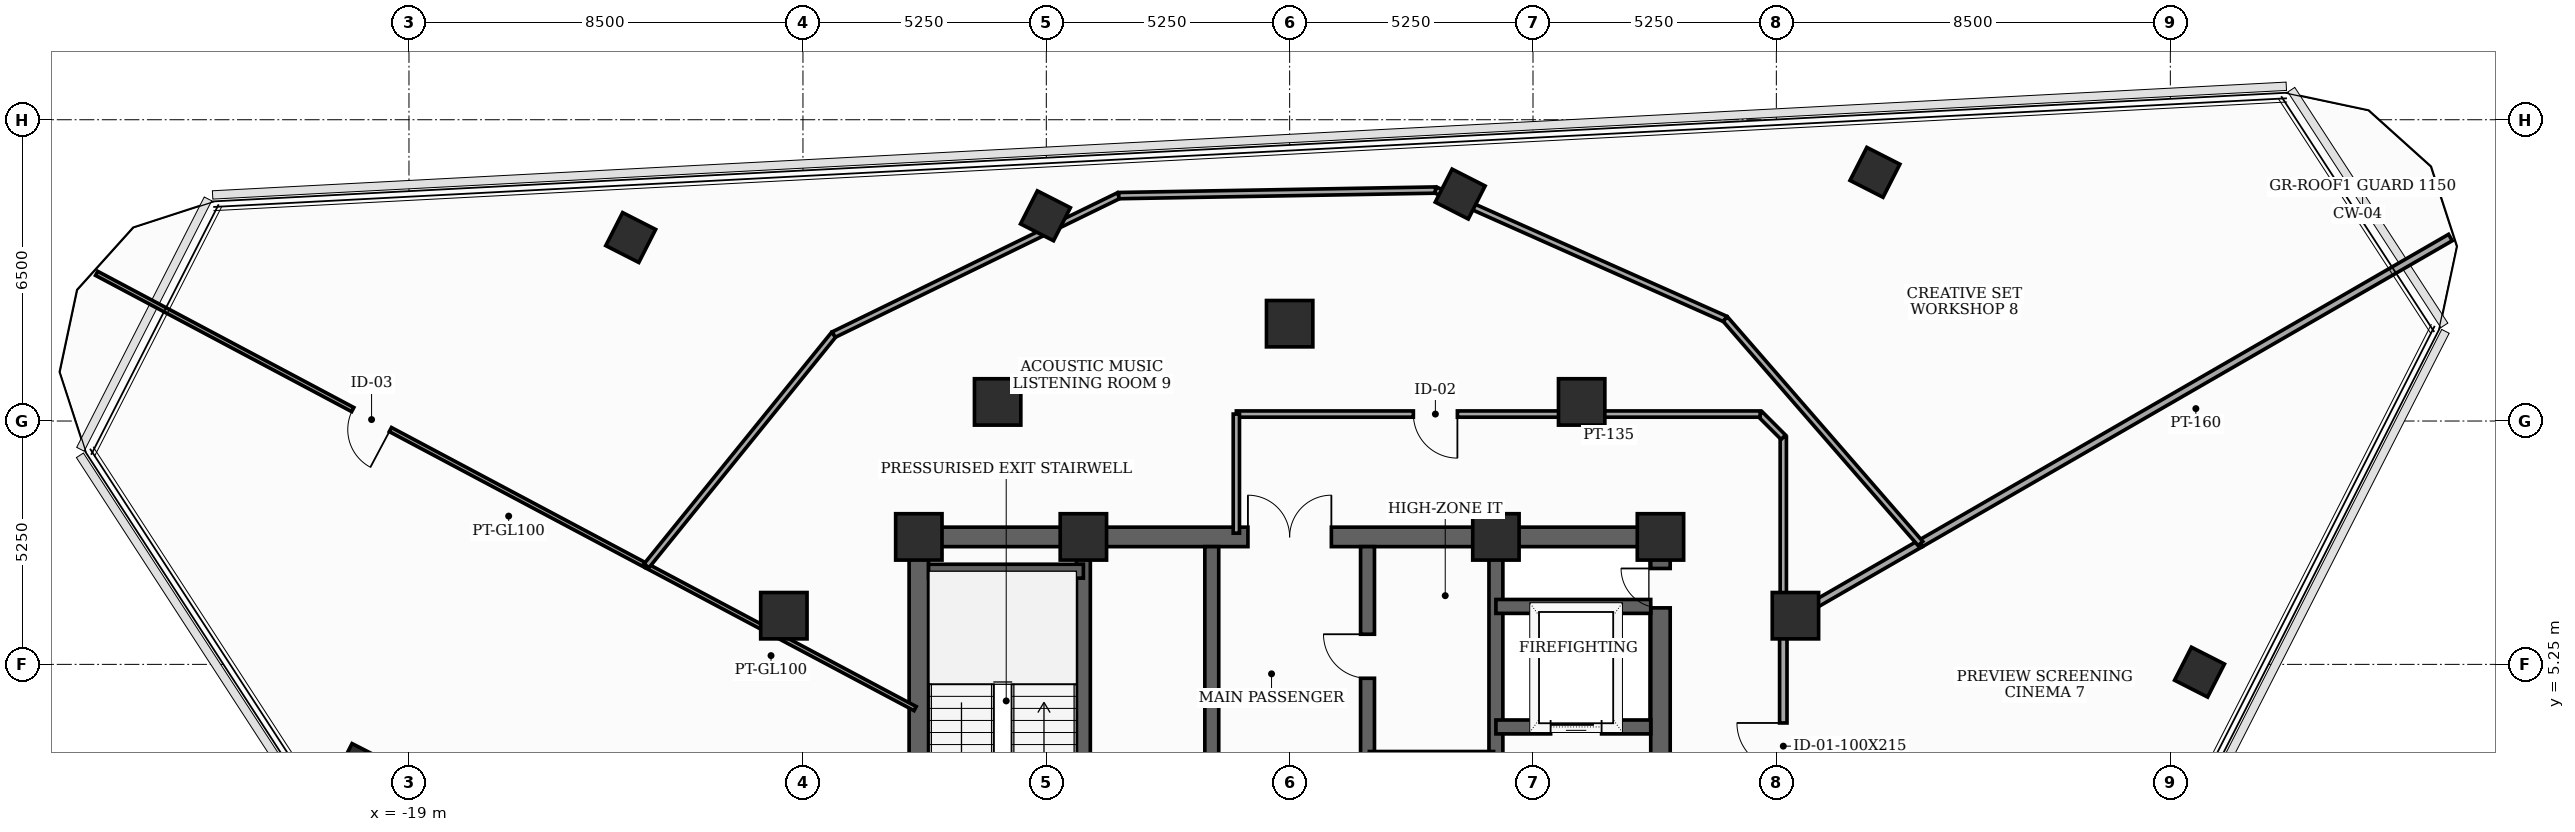
"""IFC4 building model, lengths in metres.
Left out: names, types, materials, properties, quantities, classifications, styles, units other than length and angle.
Written with IfcOpenShell. Run it as: python <this file> out.ifc"""

import sys

from ifc_helpers import new_model, si_unit, direction, frame, frame_2d, origin, origin_2d, place, context, subcontext, project, spatial, rectangle, extrude, element, fill, save


model = new_model("IFC4")
c1 = context("Model", 3, precision=1e-05, world=origin(), true_north=direction((0.0, 1.0)))
c2 = subcontext(c1, "Body", "Model", "MODEL_VIEW")
j1 = project(units=[si_unit("LENGTHUNIT", "METRE"), si_unit("PLANEANGLEUNIT", "RADIAN")], contexts=[c1])
p1 = place(None, origin())
s1 = spatial("IfcSite", under=j1, at=p1, CompositionType="ELEMENT")
p2 = place(p1, origin())
s2 = spatial("IfcBuilding", under=s1, at=p2, CompositionType="ELEMENT")
p3 = place(p2, frame((0.0, 0.0, 274.4)))
s3 = spatial("IfcBuildingStorey", under=s2, at=p3, CompositionType="ELEMENT", Elevation=274.4)
for number, where, z_axis, x_axis in (
    (1, (8.0, 8.0, 0.0), (0.0, 0.0, 1.0), (1.0, 0.0, 0.0)),
    (2, (4.45, 8.0, 0.0), (0.0, 0.0, 1.0), (1.0, 0.0, 0.0)),
    (3, (-4.45, 8.0, 0.0), (0.0, 0.0, 1.0), (1.0, 0.0, 0.0)),
    (4, (-8.0, 8.0, 0.0), (0.0, 0.0, 1.0), (1.0, 0.0, 0.0)),
    (5, (10.912, 6.3, 0.0), (0.0, 0.0, 1.0), (1.0, 0.0, 0.0)),
    (6, (6.3, 10.912, 0.0), (0.0, 0.0, 1.0), (1.0, 0.0, 0.0)),
    (7, (0.0, 12.6, 0.0), (0.0, 0.0, 1.0), (1.0, 0.0, 0.0)),
    (8, (-6.3, 10.912, 0.0), (0.0, 0.0, 1.0), (1.0, 0.0, 0.0)),
    (9, (-10.912, 6.3, 0.0), (0.0, 0.0, 1.0), (1.0, 0.0, 0.0)),
):
    element("IfcColumn", number, at=place(p3, frame(where, z_axis=z_axis, x_axis=x_axis)), inside=s3, PredefinedType="COLUMN", context=c2, shape_type="SweptSolid", body=[
        extrude(rectangle(XDim=1.0, YDim=1.0, at=origin_2d()), origin(), (0.0, 0.0, 1.0), 3.7),
    ])
for number, where, z_axis, x_axis in (
    (10, (19.629, 5.082, 0.0), (0.0, 0.0, 1.0), (0.454, 0.891, 0.0)),
    (11, (12.627, 15.865, 0.0), (0.0, 0.0, 1.0), (0.454, 0.891, 0.0)),
    (12, (3.679, 15.396, 0.0), (0.0, 0.0, 1.0), (0.454, 0.891, 0.0)),
    (13, (-5.269, 14.927, 0.0), (0.0, 0.0, 1.0), (0.454, 0.891, 0.0)),
    (14, (-14.216, 14.458, 0.0), (0.0, 0.0, 1.0), (0.454, 0.891, 0.0)),
    (15, (-20.053, 3.003, 0.0), (0.0, 0.0, 1.0), (0.454, 0.891, 0.0)),
):
    element("IfcColumn", number, at=place(p3, frame(where, z_axis=z_axis, x_axis=x_axis)), inside=s3, PredefinedType="COLUMN", context=c2, shape_type="SweptSolid", body=[
        extrude(rectangle(XDim=0.8, YDim=0.8, at=origin_2d()), origin(), (0.0, 0.0, 1.0), 3.7),
    ])
p4 = place(p3, frame((-8.0, -8.0, 0.0), z_axis=(0.0, 0.0, 1.0), x_axis=(0.0, 1.0, 0.0)))
e16 = element("IfcWall", 16, at=p4, inside=s3, PredefinedType="SHEAR", context=c2, shape_type="SweptSolid", body=[
    extrude(rectangle(XDim=16.0, YDim=0.42, at=frame_2d((8.0, 0.0))), origin(), (0.0, 0.0, 1.0), 3.46),
])
p5 = place(p4, frame((0.681, 0.0, 0.0)))
e17 = element("IfcOpeningElement", 17, at=p5, cuts=e16, PredefinedType="OPENING", context=c2, shape_type="SweptSolid", body=[
    extrude(rectangle(XDim=0.85, YDim=2.02, at=frame_2d((0.425, 1.01))), frame((0.0, 0.22, 0.0), z_axis=(0.0, -1.0, 0.0), x_axis=(1.0, 0.0, 0.0)), (0.0, 0.0, 1.0), 0.44),
])
p6 = place(p4, frame((5.35, 0.0, 0.0)))
e18 = element("IfcOpeningElement", 18, at=p6, cuts=e16, PredefinedType="OPENING", context=c2, shape_type="SweptSolid", body=[
    extrude(rectangle(XDim=1.05, YDim=2.15, at=frame_2d((0.525, 1.075))), frame((0.0, 0.22, 0.0), z_axis=(0.0, -1.0, 0.0), x_axis=(1.0, 0.0, 0.0)), (0.0, 0.0, 1.0), 0.44),
])
p7 = place(p3, frame((8.0, -8.0, 0.0), z_axis=(0.0, 0.0, 1.0), x_axis=(0.0, 1.0, 0.0)))
e19 = element("IfcWall", 19, at=p7, inside=s3, PredefinedType="SHEAR", context=c2, shape_type="SweptSolid", body=[
    extrude(rectangle(XDim=16.0, YDim=0.42, at=frame_2d((8.0, 0.0))), origin(), (0.0, 0.0, 1.0), 3.46),
])
p8 = place(p7, frame((9.6, 0.0, 0.0)))
e20 = element("IfcOpeningElement", 20, at=p8, cuts=e19, PredefinedType="OPENING", context=c2, shape_type="SweptSolid", body=[
    extrude(rectangle(XDim=1.05, YDim=2.15, at=frame_2d((0.525, 1.075))), frame((0.0, 0.22, 0.0), z_axis=(0.0, -1.0, 0.0), x_axis=(1.0, 0.0, 0.0)), (0.0, 0.0, 1.0), 0.44),
])
p9 = place(p7, frame((14.469, 0.0, 0.0)))
e21 = element("IfcOpeningElement", 21, at=p9, cuts=e19, PredefinedType="OPENING", context=c2, shape_type="SweptSolid", body=[
    extrude(rectangle(XDim=0.85, YDim=2.02, at=frame_2d((0.425, 1.01))), frame((0.0, 0.22, 0.0), z_axis=(0.0, -1.0, 0.0), x_axis=(1.0, 0.0, 0.0)), (0.0, 0.0, 1.0), 0.44),
])
p10 = place(p3, frame((-8.0, 8.0, 0.0), z_axis=(0.0, 0.0, 1.0), x_axis=(1.0, 0.0, 0.0)))
e22 = element("IfcWall", 22, at=p10, inside=s3, PredefinedType="SHEAR", context=c2, shape_type="SweptSolid", body=[
    extrude(rectangle(XDim=16.0, YDim=0.42, at=frame_2d((8.0, 0.0))), origin(), (0.0, 0.0, 1.0), 3.46),
])
p11 = place(p10, frame((7.1, 0.0, 0.0)))
e23 = element("IfcOpeningElement", 23, at=p11, cuts=e22, PredefinedType="OPENING", context=c2, shape_type="SweptSolid", body=[
    extrude(rectangle(XDim=1.8, YDim=2.15, at=frame_2d((0.9, 1.075))), frame((0.0, 0.22, 0.0), z_axis=(0.0, -1.0, 0.0), x_axis=(1.0, 0.0, 0.0)), (0.0, 0.0, 1.0), 0.44),
])
for number, where, z_axis, x_axis in (
    (24, (-4.45, -7.79, 0.0), (0.0, 0.0, 1.0), (0.0, 1.0, 0.0)),
    (25, (4.45, -7.79, 0.0), (0.0, 0.0, 1.0), (0.0, 1.0, 0.0)),
):
    element("IfcWall", number, at=place(p3, frame(where, z_axis=z_axis, x_axis=x_axis)), inside=s3, PredefinedType="SHEAR", context=c2, shape_type="SweptSolid", body=[
        extrude(rectangle(XDim=15.58, YDim=0.3, at=frame_2d((7.79, 0.0))), origin(), (0.0, 0.0, 1.0), 3.46),
    ])
p12 = place(p3, frame((-7.79, 7.26, 0.0), z_axis=(0.0, 0.0, 1.0), x_axis=(1.0, 0.0, 0.0)))
e26 = element("IfcWall", 26, at=p12, inside=s3, PredefinedType="SHEAR", context=c2, shape_type="SweptSolid", body=[
    extrude(rectangle(XDim=3.34, YDim=0.3, at=frame_2d((1.67, 0.0))), origin(), (0.0, 0.0, 1.0), 3.46),
])
p13 = place(p3, frame((4.45, 3.9, 0.0), z_axis=(0.0, 0.0, 1.0), x_axis=(1.0, 0.0, 0.0)))
e27 = element("IfcWall", 27, at=p13, inside=s3, PredefinedType="SHEAR", context=c2, shape_type="SweptSolid", body=[
    extrude(rectangle(XDim=3.34, YDim=0.3, at=frame_2d((1.67, 0.0))), origin(), (0.0, 0.0, 1.0), 3.46),
])
p14 = place(p13, frame((1.18, 0.0, 0.0)))
e28 = element("IfcOpeningElement", 28, at=p14, cuts=e27, PredefinedType="OPENING", context=c2, shape_type="SweptSolid", body=[
    extrude(rectangle(XDim=1.1, YDim=2.1, at=frame_2d((0.55, 1.05))), frame((0.0, 0.16, 0.0), z_axis=(0.0, -1.0, 0.0), x_axis=(1.0, 0.0, 0.0)), (0.0, 0.0, 1.0), 0.32),
])
p15 = place(p3, frame((4.45, 6.5, 0.0), z_axis=(0.0, 0.0, 1.0), x_axis=(1.0, 0.0, 0.0)))
e29 = element("IfcWall", 29, at=p15, inside=s3, PredefinedType="SHEAR", context=c2, shape_type="SweptSolid", body=[
    extrude(rectangle(XDim=3.34, YDim=0.3, at=frame_2d((1.67, 0.0))), origin(), (0.0, 0.0, 1.0), 3.46),
])
p16 = place(p3, frame((-1.68, -4.85, 0.0), z_axis=(0.0, 0.0, 1.0), x_axis=(0.0, 1.0, 0.0)))
e30 = element("IfcWall", 30, at=p16, inside=s3, PredefinedType="SHEAR", context=c2, shape_type="SweptSolid", body=[
    extrude(rectangle(XDim=12.64, YDim=0.3, at=frame_2d((6.32, 0.0))), origin(), (0.0, 0.0, 1.0), 3.46),
])
p17 = place(p16, frame((1.05, 0.0, 0.0)))
e31 = element("IfcOpeningElement", 31, at=p17, cuts=e30, PredefinedType="OPENING", context=c2, shape_type="SweptSolid", body=[
    extrude(rectangle(XDim=0.85, YDim=2.02, at=frame_2d((0.425, 1.01))), frame((0.0, 0.16, 0.0), z_axis=(0.0, -1.0, 0.0), x_axis=(1.0, 0.0, 0.0)), (0.0, 0.0, 1.0), 0.32),
])
p18 = place(p16, frame((6.8, 0.0, 0.0)))
e32 = element("IfcOpeningElement", 32, at=p18, cuts=e30, PredefinedType="OPENING", context=c2, shape_type="SweptSolid", body=[
    extrude(rectangle(XDim=0.95, YDim=2.1, at=frame_2d((0.475, 1.05))), frame((0.0, 0.16, 0.0), z_axis=(0.0, -1.0, 0.0), x_axis=(1.0, 0.0, 0.0)), (0.0, 0.0, 1.0), 0.32),
])
p19 = place(p3, frame((1.68, -4.85, 0.0), z_axis=(0.0, 0.0, 1.0), x_axis=(0.0, 1.0, 0.0)))
e33 = element("IfcWall", 33, at=p19, inside=s3, PredefinedType="SHEAR", context=c2, shape_type="SweptSolid", body=[
    extrude(rectangle(XDim=12.64, YDim=0.3, at=frame_2d((6.32, 0.0))), origin(), (0.0, 0.0, 1.0), 3.46),
])
p20 = place(p19, frame((0.55, 0.0, 0.0)))
e34 = element("IfcOpeningElement", 34, at=p20, cuts=e33, PredefinedType="OPENING", context=c2, shape_type="SweptSolid", body=[
    extrude(rectangle(XDim=1.1, YDim=2.1, at=frame_2d((0.55, 1.05))), frame((0.0, 0.16, 0.0), z_axis=(0.0, -1.0, 0.0), x_axis=(1.0, 0.0, 0.0)), (0.0, 0.0, 1.0), 0.32),
])
p21 = place(p19, frame((2.65, 0.0, 0.0)))
e35 = element("IfcOpeningElement", 35, at=p21, cuts=e33, PredefinedType="OPENING", context=c2, shape_type="SweptSolid", body=[
    extrude(rectangle(XDim=1.1, YDim=2.1, at=frame_2d((0.55, 1.05))), frame((0.0, 0.16, 0.0), z_axis=(0.0, -1.0, 0.0), x_axis=(1.0, 0.0, 0.0)), (0.0, 0.0, 1.0), 0.32),
])
p22 = place(p19, frame((4.75, 0.0, 0.0)))
e36 = element("IfcOpeningElement", 36, at=p22, cuts=e33, PredefinedType="OPENING", context=c2, shape_type="SweptSolid", body=[
    extrude(rectangle(XDim=1.1, YDim=2.1, at=frame_2d((0.55, 1.05))), frame((0.0, 0.16, 0.0), z_axis=(0.0, -1.0, 0.0), x_axis=(1.0, 0.0, 0.0)), (0.0, 0.0, 1.0), 0.32),
])
p23 = place(p19, frame((6.8, 0.0, 0.0)))
e37 = element("IfcOpeningElement", 37, at=p23, cuts=e33, PredefinedType="OPENING", context=c2, shape_type="SweptSolid", body=[
    extrude(rectangle(XDim=0.92, YDim=2.1, at=frame_2d((0.46, 1.05))), frame((0.0, 0.16, 0.0), z_axis=(0.0, -1.0, 0.0), x_axis=(1.0, 0.0, 0.0)), (0.0, 0.0, 1.0), 0.32),
])
p24 = place(p19, frame((9.8, 0.0, 0.0)))
e38 = element("IfcOpeningElement", 38, at=p24, cuts=e33, PredefinedType="OPENING", context=c2, shape_type="SweptSolid", body=[
    extrude(rectangle(XDim=0.95, YDim=2.1, at=frame_2d((0.475, 1.05))), frame((0.0, 0.16, 0.0), z_axis=(0.0, -1.0, 0.0), x_axis=(1.0, 0.0, 0.0)), (0.0, 0.0, 1.0), 0.32),
])
p25 = place(p3, frame((1.72, 3.27, 0.0), z_axis=(0.0, 0.0, 1.0), x_axis=(1.0, 0.0, 0.0)))
e39 = element("IfcWall", 39, at=p25, inside=s3, PredefinedType="SOLIDWALL", context=c2, shape_type="SweptSolid", body=[
    extrude(rectangle(XDim=2.68, YDim=0.2, at=frame_2d((1.34, 0.0))), origin(), (0.0, 0.0, 1.0), 3.46),
])
p26 = place(p3, frame((10.65, 2.45, 0.0), z_axis=(0.0, 0.0, 1.0), x_axis=(0.0, 1.0, 0.0)))
e40 = element("IfcWall", 40, at=p26, inside=s3, PredefinedType="PARTITIONING", context=c2, shape_type="SweptSolid", body=[
    extrude(rectangle(XDim=3.699, YDim=0.16, at=frame_2d((1.85, 0.0))), origin(), (0.0, 0.0, 1.0), 3.46),
])
p27 = place(p26, frame((0.536, 0.0, 0.0)))
e41 = element("IfcOpeningElement", 41, at=p27, cuts=e40, PredefinedType="OPENING", context=c2, shape_type="SweptSolid", body=[
    extrude(rectangle(XDim=1.0, YDim=2.15, at=frame_2d((0.5, 1.075))), frame((0.0, 0.09, 0.0), z_axis=(0.0, -1.0, 0.0), x_axis=(1.0, 0.0, 0.0)), (0.0, 0.0, 1.0), 0.18),
])
p28 = place(p3, frame((10.65, 6.149, 0.0), z_axis=(0.0, 0.0, 1.0), x_axis=(0.0, 1.0, 0.0)))
e42 = element("IfcWall", 42, at=p28, inside=s3, PredefinedType="PARTITIONING", context=c2, shape_type="SweptSolid", body=[
    extrude(rectangle(XDim=4.001, YDim=0.135, at=frame_2d((2.0, 0.0))), origin(), (0.0, 0.0, 1.0), 2.845),
])
p29 = place(p3, frame((10.65, 10.15, 0.0), z_axis=(0.0, 0.0, 1.0), x_axis=(-0.707106781187, 0.707106781187, 0.0)))
e43 = element("IfcWall", 43, at=p29, inside=s3, PredefinedType="PARTITIONING", context=c2, shape_type="SweptSolid", body=[
    extrude(rectangle(XDim=0.707, YDim=0.135, at=frame_2d((0.354, 0.0))), origin(), (0.0, 0.0, 1.0), 3.46),
])
p30 = place(p3, frame((10.15, 10.65, 0.0), z_axis=(0.0, 0.0, 1.0), x_axis=(-1.0, 0.0, 0.0)))
e44 = element("IfcWall", 44, at=p30, inside=s3, PredefinedType="PARTITIONING", context=c2, shape_type="SweptSolid", body=[
    extrude(rectangle(XDim=11.3, YDim=0.135, at=frame_2d((5.65, 0.0))), origin(), (0.0, 0.0, 1.0), 2.045),
])
p31 = place(p30, frame((6.531, 0.0, 0.0)))
e45 = element("IfcOpeningElement", 45, at=p31, cuts=e44, PredefinedType="OPENING", context=c2, shape_type="SweptSolid", body=[
    extrude(rectangle(XDim=0.95, YDim=2.0, at=frame_2d((0.475, 1.0))), frame((0.0, 0.077, 0.0), z_axis=(0.0, -1.0, 0.0), x_axis=(1.0, 0.0, 0.0)), (0.0, 0.0, 1.0), 0.155),
])
p32 = place(p3, frame((-1.15, 10.65, 0.0), z_axis=(0.0, 0.0, 1.0), x_axis=(0.0, -1.0, 0.0)))
e46 = element("IfcWall", 46, at=p32, inside=s3, PredefinedType="PARTITIONING", context=c2, shape_type="SweptSolid", body=[
    extrude(rectangle(XDim=2.57, YDim=0.135, at=frame_2d((1.285, 0.0))), origin(), (0.0, 0.0, 1.0), 2.845),
])
p33 = place(p3, frame((-13.875, 7.377, 0.0), z_axis=(0.0, 0.0, 1.0), x_axis=(-0.882931208137, 0.469502376668, 0.0)))
e47 = element("IfcWall", 47, at=p33, inside=s3, PredefinedType="MOVABLE", context=c2, shape_type="SweptSolid", body=[
    extrude(rectangle(XDim=13.436, YDim=0.1, at=frame_2d((6.718, 0.0))), origin(), (0.0, 0.0, 1.0), 2.045),
])
p34 = place(p33, frame((6.258, 0.0, 0.0)))
e48 = element("IfcOpeningElement", 48, at=p34, cuts=e47, PredefinedType="OPENING", context=c2, shape_type="SweptSolid", body=[
    extrude(rectangle(XDim=0.92, YDim=2.0, at=frame_2d((0.46, 1.0))), frame((0.0, 0.06, 0.0), z_axis=(0.0, -1.0, 0.0), x_axis=(1.0, 0.0, 0.0)), (0.0, 0.0, 1.0), 0.12),
])
p35 = place(p3, frame((-8.08, 4.296, 0.0), z_axis=(0.0, 0.0, 1.0), x_axis=(-0.882957693651, 0.469452565465, 0.0)))
e49 = element("IfcWall", 49, at=p35, inside=s3, PredefinedType="MOVABLE", context=c2, shape_type="SweptSolid", body=[
    extrude(rectangle(XDim=6.563, YDim=0.1, at=frame_2d((3.281, 0.0))), origin(), (0.0, 0.0, 1.0), 2.845),
])
p36 = place(p3, frame((25.042, 14.458, 0.0), z_axis=(0.0, 0.0, 1.0), x_axis=(-0.866013134896, -0.500021249735, 0.0)))
e50 = element("IfcWall", 50, at=p36, inside=s3, PredefinedType="PARTITIONING", context=c2, shape_type="SweptSolid", body=[
    extrude(rectangle(XDim=13.203, YDim=0.16, at=frame_2d((6.601, 0.0))), origin(), (0.0, 0.0, 1.0), 2.045),
])
p37 = place(p3, frame((13.609, 7.857, 0.0), z_axis=(0.0, 0.0, 1.0), x_axis=(-0.866071357471, -0.499920397431, 0.0)))
e51 = element("IfcWall", 51, at=p37, inside=s3, PredefinedType="PARTITIONING", context=c2, shape_type="SweptSolid", body=[
    extrude(rectangle(XDim=3.417, YDim=0.16, at=frame_2d((1.708, 0.0))), origin(), (0.0, 0.0, 1.0), 2.045),
])
p38 = place(p3, frame((-13.875, 7.377, 0.0), z_axis=(0.0, 0.0, 1.0), x_axis=(0.629304365076, 0.777158938761, 0.0)))
e52 = element("IfcWall", 52, at=p38, inside=s3, PredefinedType="PARTITIONING", context=c2, shape_type="SweptSolid", body=[
    extrude(rectangle(XDim=6.418, YDim=0.135, at=frame_2d((3.209, 0.0))), origin(), (0.0, 0.0, 1.0), 2.045),
])
p39 = place(p3, frame((-9.836, 12.365, 0.0), z_axis=(0.0, 0.0, 1.0), x_axis=(0.898823324655, 0.438311112174, 0.0)))
e53 = element("IfcWall", 53, at=p39, inside=s3, PredefinedType="PARTITIONING", context=c2, shape_type="SweptSolid", body=[
    extrude(rectangle(XDim=6.84, YDim=0.135, at=frame_2d((3.42, 0.0))), origin(), (0.0, 0.0, 1.0), 2.045),
])
p40 = place(p3, frame((-3.688, 15.363, 0.0), z_axis=(0.0, 0.0, 1.0), x_axis=(0.999846372591, 0.017528012316, 0.0)))
e54 = element("IfcWall", 54, at=p40, inside=s3, PredefinedType="PARTITIONING", context=c2, shape_type="SweptSolid", body=[
    extrude(rectangle(XDim=6.839, YDim=0.135, at=frame_2d((3.419, 0.0))), origin(), (0.0, 0.0, 1.0), 2.045),
])
p41 = place(p3, frame((3.15, 15.483, 0.0), z_axis=(0.0, 0.0, 1.0), x_axis=(0.913536073518, -0.406757719511, 0.0)))
e55 = element("IfcWall", 55, at=p41, inside=s3, PredefinedType="PARTITIONING", context=c2, shape_type="SweptSolid", body=[
    extrude(rectangle(XDim=6.839, YDim=0.135, at=frame_2d((3.42, 0.0))), origin(), (0.0, 0.0, 1.0), 2.045),
])
p42 = place(p3, frame((9.398, 12.701, 0.0), z_axis=(0.0, 0.0, 1.0), x_axis=(0.656069468174, -0.754700505452, 0.0)))
e56 = element("IfcWall", 56, at=p42, inside=s3, PredefinedType="PARTITIONING", context=c2, shape_type="SweptSolid", body=[
    extrude(rectangle(XDim=6.418, YDim=0.135, at=frame_2d((3.209, 0.0))), origin(), (0.0, 0.0, 1.0), 3.145),
])
p43 = place(p9, origin())
e57 = element("IfcDoor", 57, at=p43, inside=s3, OperationType="SINGLE_SWING_RIGHT", PredefinedType="TRAPDOOR", context=c2, shape_type="SweptSolid", body=[
    extrude(rectangle(XDim=0.85, YDim=2.02, at=frame_2d((0.425, 1.01))), frame((0.0, 0.025, 0.0), z_axis=(0.0, -1.0, 0.0), x_axis=(1.0, 0.0, 0.0)), (0.0, 0.0, 1.0), 0.05),
])
fill(e21, e57)
p44 = place(p11, origin())
e58 = element("IfcDoor", 58, at=p44, inside=s3, OperationType="DOUBLE_DOOR_SINGLE_SWING", PredefinedType="DOOR", context=c2, shape_type="SweptSolid", body=[
    extrude(rectangle(XDim=1.8, YDim=2.15, at=frame_2d((0.9, 1.075))), frame((0.0, 0.025, 0.0), z_axis=(0.0, -1.0, 0.0), x_axis=(1.0, 0.0, 0.0)), (0.0, 0.0, 1.0), 0.05),
])
fill(e23, e58)
p45 = place(p14, origin())
e59 = element("IfcDoor", 59, at=p45, inside=s3, OperationType="SLIDING_TO_LEFT", PredefinedType="DOOR", context=c2, shape_type="SweptSolid", body=[
    extrude(rectangle(XDim=1.1, YDim=2.1, at=frame_2d((0.55, 1.05))), frame((0.0, 0.025, 0.0), z_axis=(0.0, -1.0, 0.0), x_axis=(1.0, 0.0, 0.0)), (0.0, 0.0, 1.0), 0.05),
])
fill(e28, e59)
p46 = place(p24, origin())
e60 = element("IfcDoor", 60, at=p46, inside=s3, OperationType="SINGLE_SWING_RIGHT", PredefinedType="DOOR", context=c2, shape_type="SweptSolid", body=[
    extrude(rectangle(XDim=0.95, YDim=2.1, at=frame_2d((0.475, 1.05))), frame((0.0, 0.025, 0.0), z_axis=(0.0, -1.0, 0.0), x_axis=(1.0, 0.0, 0.0)), (0.0, 0.0, 1.0), 0.05),
])
fill(e38, e60)
p47 = place(p27, origin())
e61 = element("IfcDoor", 61, at=p47, inside=s3, OperationType="SINGLE_SWING_RIGHT", PredefinedType="DOOR", context=c2, shape_type="SweptSolid", body=[
    extrude(rectangle(XDim=1.0, YDim=2.15, at=frame_2d((0.5, 1.075))), frame((0.0, 0.025, 0.0), z_axis=(0.0, -1.0, 0.0), x_axis=(1.0, 0.0, 0.0)), (0.0, 0.0, 1.0), 0.05),
])
fill(e41, e61)
p48 = place(p31, origin())
e62 = element("IfcDoor", 62, at=p48, inside=s3, OperationType="SINGLE_SWING_LEFT", PredefinedType="DOOR", context=c2, shape_type="SweptSolid", body=[
    extrude(rectangle(XDim=0.95, YDim=2.0, at=frame_2d((0.475, 1.0))), frame((0.0, 0.025, 0.0), z_axis=(0.0, -1.0, 0.0), x_axis=(1.0, 0.0, 0.0)), (0.0, 0.0, 1.0), 0.05),
])
fill(e45, e62)
p49 = place(p34, origin())
e63 = element("IfcDoor", 63, at=p49, inside=s3, OperationType="SINGLE_SWING_LEFT", PredefinedType="DOOR", context=c2, shape_type="SweptSolid", body=[
    extrude(rectangle(XDim=0.92, YDim=2.0, at=frame_2d((0.46, 1.0))), frame((0.0, 0.025, 0.0), z_axis=(0.0, -1.0, 0.0), x_axis=(1.0, 0.0, 0.0)), (0.0, 0.0, 1.0), 0.05),
])
fill(e48, e63)
save(model, sys.argv[1])
